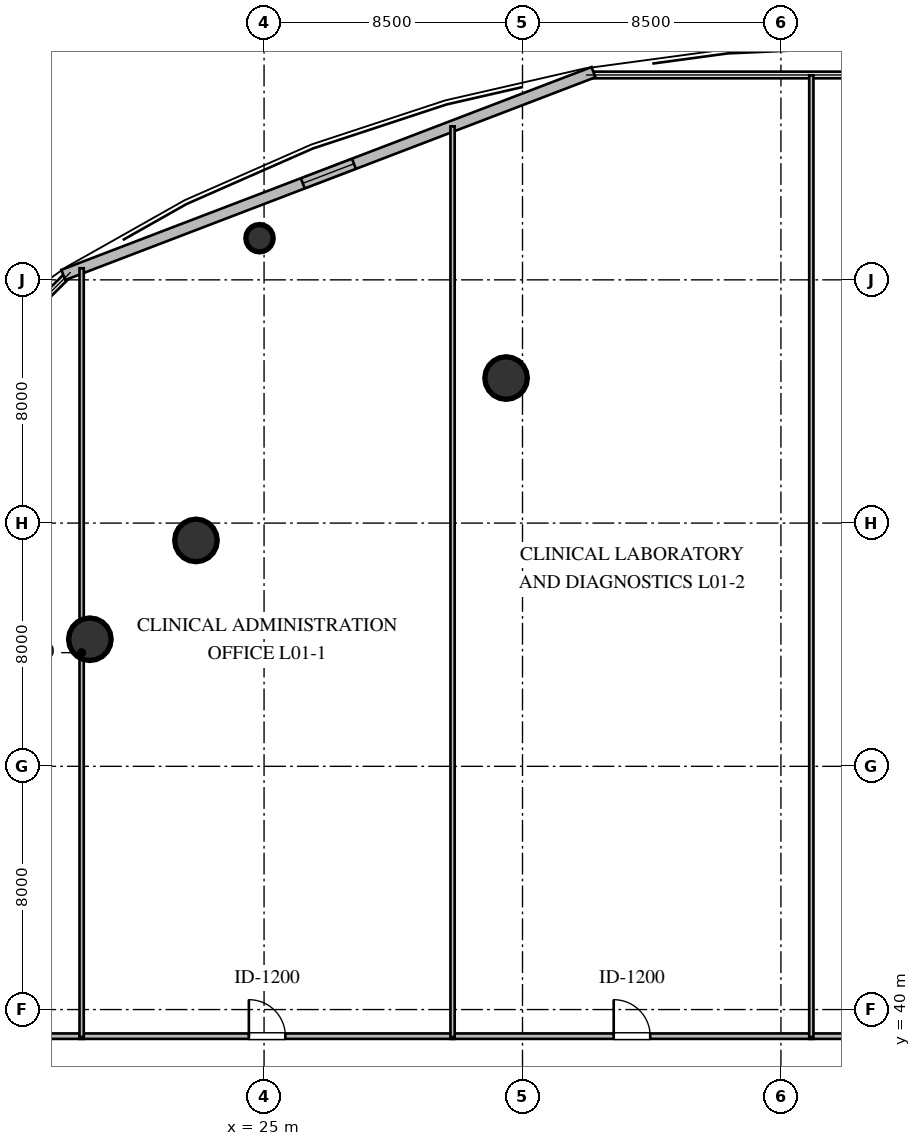
"""IFC4 building model, lengths in metres.
Left out: names, types, materials, properties, quantities, classifications, styles, units other than length and angle.
Written with IfcOpenShell. Run it as: python <this file> out.ifc"""

import sys

from ifc_helpers import new_model, si_unit, direction, frame, frame_2d, origin, origin_2d, place, context, subcontext, project, spatial, rectangle, circle, extrude, element, fill, save


model = new_model("IFC4")
c1 = context("Model", 3, precision=1e-05, world=origin(), true_north=direction((0.0, 1.0)))
c2 = subcontext(c1, "Body", "Model", "MODEL_VIEW")
j1 = project(units=[si_unit("LENGTHUNIT", "METRE"), si_unit("PLANEANGLEUNIT", "RADIAN")], contexts=[c1])
p1 = place(None, origin())
s1 = spatial("IfcSite", under=j1, at=p1, CompositionType="ELEMENT")
p2 = place(p1, origin())
s2 = spatial("IfcBuilding", under=s1, at=p2, CompositionType="ELEMENT")
p3 = place(p2, frame((0.0, 0.0, 4.8)))
s3 = spatial("IfcBuildingStorey", under=s2, at=p3, CompositionType="ELEMENT", Elevation=4.8)
for number, where, z_axis, x_axis in (
    (1, (32.96, 60.77, 0.0), (0.0, 0.0, 1.0), (1.0, 0.0, 0.0)),
    (2, (22.76, 55.43, 0.0), (0.0, 0.0, 1.0), (1.0, 0.0, 0.0)),
    (3, (19.27, 52.18, 0.0), (0.0, 0.0, 1.0), (1.0, 0.0, 0.0)),
):
    element("IfcColumn", number, at=place(p3, frame(where, z_axis=z_axis, x_axis=x_axis)), inside=s3, PredefinedType="COLUMN", context=c2, shape_type="SweptSolid", body=[
        extrude(circle(Radius=0.7, at=origin_2d()), origin(), (0.0, 0.0, 1.0), 4.8),
    ])
p4 = place(p3, frame((24.85, 65.37, 0.0), z_axis=(0.0, 0.0, 1.0), x_axis=(1.0, 0.0, 0.0)))
e4 = element("IfcColumn", 4, at=p4, inside=s3, PredefinedType="COLUMN", context=c2, shape_type="SweptSolid", body=[
    extrude(circle(Radius=0.45, at=origin_2d()), origin(), (0.0, 0.0, 1.0), 4.8),
])
p5 = place(p3, frame((35.835, 70.831, 0.0), z_axis=(0.0, 0.0, 1.0), x_axis=(-0.934010262022, -0.357246176238, 0.0)))
e5 = element("IfcWall", 5, at=p5, inside=s3, PredefinedType="STANDARD", context=c2, shape_type="SweptSolid", body=[
    extrude(rectangle(XDim=18.671, YDim=0.36, at=frame_2d((9.335, 0.0))), origin(), (0.0, 0.0, 1.0), 4.52),
])
p6 = place(p5, frame((8.436, 0.0, 1.05)))
e6 = element("IfcOpeningElement", 6, at=p6, cuts=e5, PredefinedType="OPENING", context=c2, shape_type="SweptSolid", body=[
    extrude(rectangle(XDim=1.8, YDim=1.7, at=frame_2d((0.9, 0.85))), frame((0.0, 0.19, 0.0), z_axis=(0.0, -1.0, 0.0), x_axis=(1.0, 0.0, 0.0)), (0.0, 0.0, 1.0), 0.38),
])
p7 = place(p3, frame((13.97, 39.125, 0.0), z_axis=(0.0, 0.0, 1.0), x_axis=(1.0, 0.0, 0.0)))
e7 = element("IfcWall", 7, at=p7, inside=s3, PredefinedType="PARTITIONING", context=c2, shape_type="SweptSolid", body=[
    extrude(rectangle(XDim=5.095, YDim=0.18, at=frame_2d((2.547, 0.0))), origin(), (0.0, 0.0, 1.0), 4.52),
])
p8 = place(p7, frame((1.947, 0.0, 0.0)))
e8 = element("IfcOpeningElement", 8, at=p8, cuts=e7, PredefinedType="OPENING", context=c2, shape_type="SweptSolid", body=[
    extrude(rectangle(XDim=1.2, YDim=2.15, at=frame_2d((0.6, 1.075))), frame((0.0, 0.1, 0.0), z_axis=(0.0, -1.0, 0.0), x_axis=(1.0, 0.0, 0.0)), (0.0, 0.0, 1.0), 0.2),
])
p9 = place(p3, frame((18.935, 39.125, 0.0), z_axis=(0.0, 0.0, 1.0), x_axis=(1.0, 0.0, 0.0)))
e9 = element("IfcWall", 9, at=p9, inside=s3, PredefinedType="PARTITIONING", context=c2, shape_type="SweptSolid", body=[
    extrude(rectangle(XDim=12.33, YDim=0.18, at=frame_2d((6.165, 0.0))), origin(), (0.0, 0.0, 1.0), 4.52),
])
p10 = place(p9, frame((5.565, 0.0, 0.0)))
e10 = element("IfcOpeningElement", 10, at=p10, cuts=e9, PredefinedType="OPENING", context=c2, shape_type="SweptSolid", body=[
    extrude(rectangle(XDim=1.2, YDim=2.15, at=frame_2d((0.6, 1.075))), frame((0.0, 0.1, 0.0), z_axis=(0.0, -1.0, 0.0), x_axis=(1.0, 0.0, 0.0)), (0.0, 0.0, 1.0), 0.2),
])
p11 = place(p3, frame((31.135, 39.125, 0.0), z_axis=(0.0, 0.0, 1.0), x_axis=(1.0, 0.0, 0.0)))
e11 = element("IfcWall", 11, at=p11, inside=s3, PredefinedType="PARTITIONING", context=c2, shape_type="SweptSolid", body=[
    extrude(rectangle(XDim=11.93, YDim=0.18, at=frame_2d((5.965, 0.0))), origin(), (0.0, 0.0, 1.0), 4.52),
])
p12 = place(p11, frame((5.365, 0.0, 0.0)))
e12 = element("IfcOpeningElement", 12, at=p12, cuts=e11, PredefinedType="OPENING", context=c2, shape_type="SweptSolid", body=[
    extrude(rectangle(XDim=1.2, YDim=2.15, at=frame_2d((0.6, 1.075))), frame((0.0, 0.1, 0.0), z_axis=(0.0, -1.0, 0.0), x_axis=(1.0, 0.0, 0.0)), (0.0, 0.0, 1.0), 0.2),
])
p13 = place(p3, frame((42.935, 39.125, 0.0), z_axis=(0.0, 0.0, 1.0), x_axis=(1.0, 0.0, 0.0)))
e13 = element("IfcWall", 13, at=p13, inside=s3, PredefinedType="PARTITIONING", context=c2, shape_type="SweptSolid", body=[
    extrude(rectangle(XDim=12.33, YDim=0.18, at=frame_2d((6.165, 0.0))), origin(), (0.0, 0.0, 1.0), 4.52),
])
p14 = place(p13, frame((5.565, 0.0, 0.0)))
e14 = element("IfcOpeningElement", 14, at=p14, cuts=e13, PredefinedType="OPENING", context=c2, shape_type="SweptSolid", body=[
    extrude(rectangle(XDim=1.2, YDim=2.15, at=frame_2d((0.6, 1.075))), frame((0.0, 0.1, 0.0), z_axis=(0.0, -1.0, 0.0), x_axis=(1.0, 0.0, 0.0)), (0.0, 0.0, 1.0), 0.2),
])
p15 = place(p3, frame((19.0, 64.382, 0.0), z_axis=(0.0, 0.0, 1.0), x_axis=(0.0, -1.0, 0.0)))
e15 = element("IfcWall", 15, at=p15, inside=s3, PredefinedType="PARTITIONING", context=c2, shape_type="SweptSolid", body=[
    extrude(rectangle(XDim=25.287, YDim=0.14, at=frame_2d((12.644, 0.0))), origin(), (0.0, 0.0, 1.0), 4.05),
])
p16 = place(p3, frame((31.2, 69.048, 0.0), z_axis=(0.0, 0.0, 1.0), x_axis=(0.0, -1.0, 0.0)))
e16 = element("IfcWall", 16, at=p16, inside=s3, PredefinedType="PARTITIONING", context=c2, shape_type="SweptSolid", body=[
    extrude(rectangle(XDim=29.953, YDim=0.14, at=frame_2d((14.977, 0.0))), origin(), (0.0, 0.0, 1.0), 4.05),
])
p17 = place(p3, frame((43.0, 70.728, 0.0), z_axis=(0.0, 0.0, 1.0), x_axis=(0.0, -1.0, 0.0)))
e17 = element("IfcWall", 17, at=p17, inside=s3, PredefinedType="PARTITIONING", context=c2, shape_type="SweptSolid", body=[
    extrude(rectangle(XDim=31.633, YDim=0.14, at=frame_2d((15.816, 0.0))), origin(), (0.0, 0.0, 1.0), 4.52),
])
p18 = place(p6, origin())
e18 = element("IfcWindow", 18, at=p18, inside=s3, PartitioningType="SINGLE_PANEL", PredefinedType="WINDOW", context=c2, shape_type="SweptSolid", body=[
    extrude(rectangle(XDim=1.8, YDim=1.7, at=frame_2d((0.9, 0.85))), frame((0.0, 0.03, 0.0), z_axis=(0.0, -1.0, 0.0), x_axis=(1.0, 0.0, 0.0)), (0.0, 0.0, 1.0), 0.06),
])
fill(e6, e18)
p19 = place(p10, origin())
e19 = element("IfcDoor", 19, at=p19, inside=s3, OperationType="SINGLE_SWING_LEFT", PredefinedType="DOOR", context=c2, shape_type="SweptSolid", body=[
    extrude(rectangle(XDim=1.2, YDim=2.15, at=frame_2d((0.6, 1.075))), frame((0.0, 0.025, 0.0), z_axis=(0.0, -1.0, 0.0), x_axis=(1.0, 0.0, 0.0)), (0.0, 0.0, 1.0), 0.05),
])
fill(e10, e19)
p20 = place(p12, origin())
e20 = element("IfcDoor", 20, at=p20, inside=s3, OperationType="SINGLE_SWING_LEFT", PredefinedType="DOOR", context=c2, shape_type="SweptSolid", body=[
    extrude(rectangle(XDim=1.2, YDim=2.15, at=frame_2d((0.6, 1.075))), frame((0.0, 0.025, 0.0), z_axis=(0.0, -1.0, 0.0), x_axis=(1.0, 0.0, 0.0)), (0.0, 0.0, 1.0), 0.05),
])
fill(e12, e20)
save(model, sys.argv[1])
